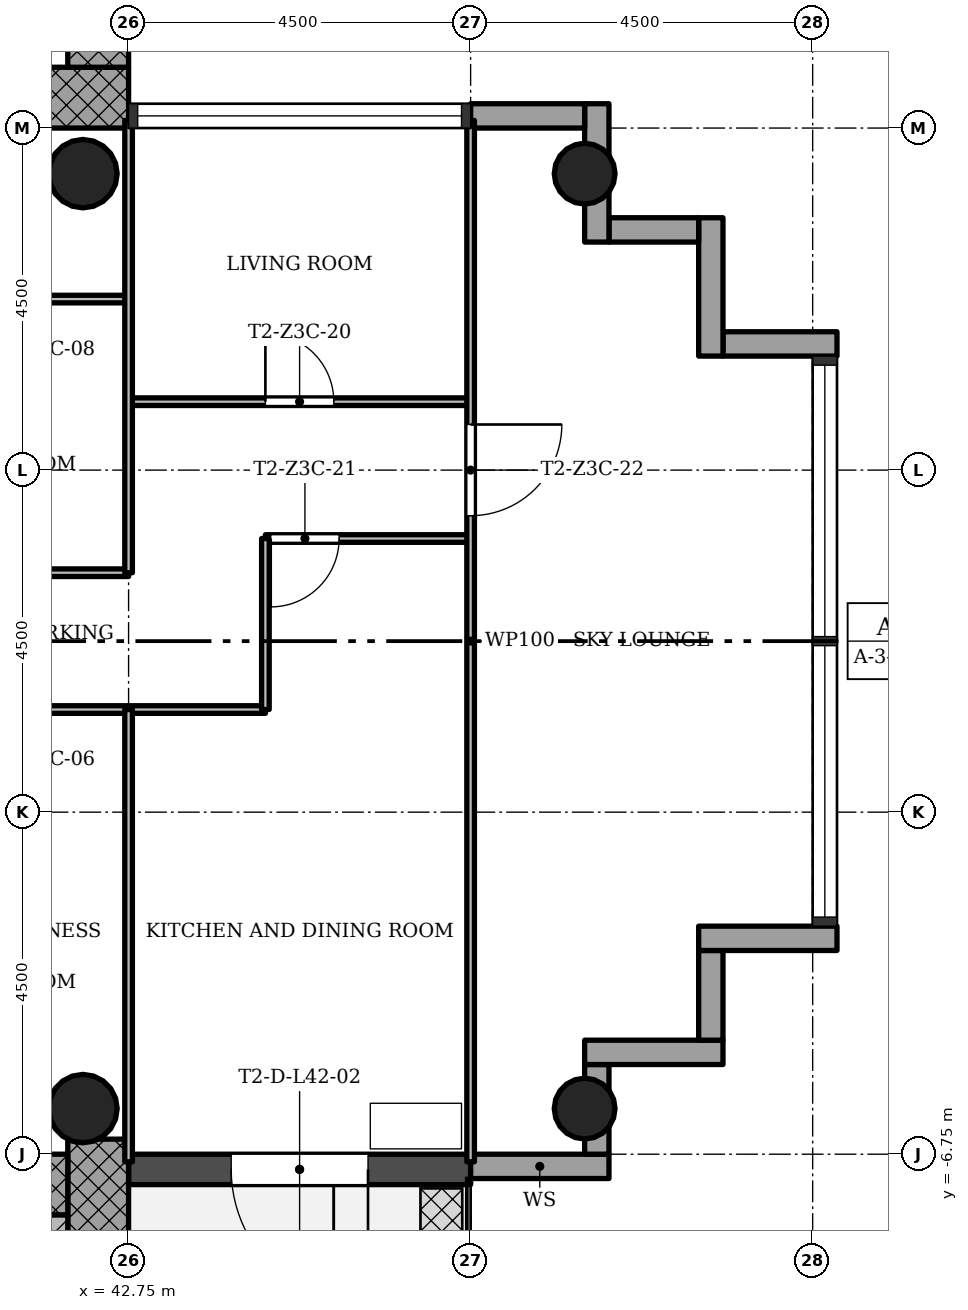
"""IFC4 building model, lengths in metres.
Left out: names, types, materials, properties, quantities, classifications, styles, units other than length and angle.
Written with IfcOpenShell. Run it as: python <this file> out.ifc"""

import sys

from ifc_helpers import new_model, si_unit, direction, frame, frame_2d, origin, origin_2d, place, context, subcontext, project, spatial, rectangle, hollow_circle, extrude, element, fill, save


model = new_model("IFC4")
c1 = context("Model", 3, precision=1e-05, world=origin(), true_north=direction((0.0, 1.0)))
c2 = subcontext(c1, "Body", "Model", "MODEL_VIEW")
j1 = project(units=[si_unit("LENGTHUNIT", "METRE"), si_unit("PLANEANGLEUNIT", "RADIAN")], contexts=[c1])
p1 = place(None, origin())
s1 = spatial("IfcSite", under=j1, at=p1, CompositionType="ELEMENT")
p2 = place(p1, origin())
s2 = spatial("IfcBuilding", under=s1, at=p2, CompositionType="ELEMENT")
p3 = place(p2, frame((0.0, 0.0, 154.1)))
s3 = spatial("IfcBuildingStorey", under=s2, at=p3, CompositionType="ELEMENT", Elevation=154.1)
p4 = place(p3, frame((30.05, 7.15, 0.0), z_axis=(0.0, 0.0, 1.0), x_axis=(1.0, 0.0, 0.0)))
e1 = element("IfcWall", 1, at=p4, inside=s3, PredefinedType="SHEAR", context=c2, shape_type="SweptSolid", body=[
    extrude(rectangle(XDim=12.7, YDim=0.8, at=frame_2d((6.35, 0.0))), origin(), (0.0, 0.0, 1.0), 3.4),
])
p5 = place(p4, frame((5.05, 0.0, 0.0)))
e2 = element("IfcOpeningElement", 2, at=p5, cuts=e1, PredefinedType="OPENING", context=c2, shape_type="SweptSolid", body=[
    extrude(rectangle(XDim=1.8, YDim=2.1, at=frame_2d((0.9, 1.05))), frame((0.0, 0.41, 0.0), z_axis=(0.0, -1.0, 0.0), x_axis=(1.0, 0.0, 0.0)), (0.0, 0.0, 1.0), 0.82),
])
p6 = place(p3, frame((42.35, 7.55, 0.0), z_axis=(0.0, 0.0, 1.0), x_axis=(0.0, 1.0, 0.0)))
e3 = element("IfcWall", 3, at=p6, inside=s3, PredefinedType="SHEAR", context=c2, shape_type="SweptSolid", body=[
    extrude(rectangle(XDim=8.2, YDim=0.8, at=frame_2d((4.1, 0.0))), origin(), (0.0, 0.0, 1.0), 3.4),
])
p7 = place(p3, frame((42.35, -14.95, 0.0), z_axis=(0.0, 0.0, 1.0), x_axis=(0.0, 1.0, 0.0)))
e4 = element("IfcWall", 4, at=p7, inside=s3, PredefinedType="SHEAR", context=c2, shape_type="SweptSolid", body=[
    extrude(rectangle(XDim=8.398, YDim=0.8, at=frame_2d((4.199, 0.0))), origin(), (0.0, 0.0, 1.0), 3.4),
])
p8 = place(p3, frame((41.95, -7.15, 0.0), z_axis=(0.0, 0.0, 1.0), x_axis=(-1.0, 0.0, 0.0)))
e5 = element("IfcWall", 5, at=p8, inside=s3, PredefinedType="SHEAR", context=c2, shape_type="SweptSolid", body=[
    extrude(rectangle(XDim=12.7, YDim=0.8, at=frame_2d((6.35, 0.0))), origin(), (0.0, 0.0, 1.0), 3.4),
])
p9 = place(p8, frame((5.05, 0.0, 0.0)))
e6 = element("IfcOpeningElement", 6, at=p9, cuts=e5, PredefinedType="OPENING", context=c2, shape_type="SweptSolid", body=[
    extrude(rectangle(XDim=1.8, YDim=2.1, at=frame_2d((0.9, 1.05))), frame((0.0, 0.41, 0.0), z_axis=(0.0, -1.0, 0.0), x_axis=(1.0, 0.0, 0.0)), (0.0, 0.0, 1.0), 0.82),
])
for number, where, z_axis, x_axis in (
    (7, (48.75, -6.15, 0.0), (0.0, 0.0, 1.0), (1.0, 0.0, 0.0)),
    (8, (48.75, 6.15, 0.0), (0.0, 0.0, 1.0), (1.0, 0.0, 0.0)),
):
    element("IfcColumn", number, at=place(p3, frame(where, z_axis=z_axis, x_axis=x_axis)), inside=s3, PredefinedType="COLUMN", context=c2, shape_type="SweptSolid", body=[
        extrude(hollow_circle(Radius=0.4, WallThickness=0.028, at=origin_2d()), origin(), (0.0, 0.0, 1.0), 3.4),
    ])
for number, where, z_axis, x_axis in (
    (9, (42.15, -6.15, 0.0), (0.0, 0.0, 1.0), (1.0, 0.0, 0.0)),
    (10, (42.15, 6.15, 0.0), (0.0, 0.0, 1.0), (1.0, 0.0, 0.0)),
):
    element("IfcColumn", number, at=place(p3, frame(where, z_axis=z_axis, x_axis=x_axis)), inside=s3, PredefinedType="COLUMN", context=c2, shape_type="SweptSolid", body=[
        extrude(hollow_circle(Radius=0.45, WallThickness=0.032, at=origin_2d()), origin(), (0.0, 0.0, 1.0), 3.4),
    ])
p10 = place(p3, frame((42.75, -6.95, -0.02), z_axis=(0.0, 0.0, 1.0), x_axis=(1.0, 0.0, 0.0)))
e11 = element("IfcWall", 11, at=p10, inside=s3, PredefinedType="STANDARD", context=c2, shape_type="SweptSolid", body=[
    extrude(rectangle(XDim=4.5, YDim=0.4, at=frame_2d((2.25, 0.0))), origin(), (0.0, 0.0, 1.0), 3.12),
])
p11 = place(p10, frame((1.35, 0.0, 0.02)))
e12 = element("IfcOpeningElement", 12, at=p11, cuts=e11, PredefinedType="OPENING", context=c2, shape_type="SweptSolid", body=[
    extrude(rectangle(XDim=1.8, YDim=2.1, at=frame_2d((0.9, 1.05))), frame((0.0, 0.21, 0.0), z_axis=(0.0, -1.0, 0.0), x_axis=(1.0, 0.0, 0.0)), (0.0, 0.0, 1.0), 0.42),
])
p12 = place(p3, frame((47.25, -6.91, -0.3), z_axis=(0.0, 0.0, 1.0), x_axis=(1.0, 0.0, 0.0)))
e13 = element("IfcWall", 13, at=p12, inside=s3, PredefinedType="STANDARD", context=c2, shape_type="SweptSolid", body=[
    extrude(rectangle(XDim=1.82, YDim=0.32, at=frame_2d((0.91, 0.0))), origin(), (0.0, 0.0, 1.0), 3.4),
])
p13 = place(p3, frame((48.91, -6.75, -0.3), z_axis=(0.0, 0.0, 1.0), x_axis=(0.0, 1.0, 0.0)))
e14 = element("IfcWall", 14, at=p13, inside=s3, PredefinedType="STANDARD", context=c2, shape_type="SweptSolid", body=[
    extrude(rectangle(XDim=1.18, YDim=0.32, at=frame_2d((0.59, 0.0))), origin(), (0.0, 0.0, 1.0), 3.4),
])
p14 = place(p3, frame((48.75, -5.41, -0.3), z_axis=(0.0, 0.0, 1.0), x_axis=(1.0, 0.0, 0.0)))
e15 = element("IfcWall", 15, at=p14, inside=s3, PredefinedType="STANDARD", context=c2, shape_type="SweptSolid", body=[
    extrude(rectangle(XDim=1.82, YDim=0.32, at=frame_2d((0.91, 0.0))), origin(), (0.0, 0.0, 1.0), 3.4),
])
p15 = place(p3, frame((50.41, -5.25, -0.3), z_axis=(0.0, 0.0, 1.0), x_axis=(0.0, 1.0, 0.0)))
e16 = element("IfcWall", 16, at=p15, inside=s3, PredefinedType="STANDARD", context=c2, shape_type="SweptSolid", body=[
    extrude(rectangle(XDim=1.18, YDim=0.32, at=frame_2d((0.59, 0.0))), origin(), (0.0, 0.0, 1.0), 3.4),
])
p16 = place(p3, frame((50.25, -3.91, -0.3), z_axis=(0.0, 0.0, 1.0), x_axis=(1.0, 0.0, 0.0)))
e17 = element("IfcWall", 17, at=p16, inside=s3, PredefinedType="STANDARD", context=c2, shape_type="SweptSolid", body=[
    extrude(rectangle(XDim=1.82, YDim=0.32, at=frame_2d((0.91, 0.0))), origin(), (0.0, 0.0, 1.0), 3.4),
])
p17 = place(p3, frame((52.07, 3.91, -0.3), z_axis=(0.0, 0.0, 1.0), x_axis=(-1.0, 0.0, 0.0)))
e18 = element("IfcWall", 18, at=p17, inside=s3, PredefinedType="STANDARD", context=c2, shape_type="SweptSolid", body=[
    extrude(rectangle(XDim=1.5, YDim=0.32, at=frame_2d((0.75, 0.0))), origin(), (0.0, 0.0, 1.0), 3.4),
])
p18 = place(p3, frame((50.41, 3.75, -0.3), z_axis=(0.0, 0.0, 1.0), x_axis=(0.0, 1.0, 0.0)))
e19 = element("IfcWall", 19, at=p18, inside=s3, PredefinedType="STANDARD", context=c2, shape_type="SweptSolid", body=[
    extrude(rectangle(XDim=1.82, YDim=0.32, at=frame_2d((0.91, 0.0))), origin(), (0.0, 0.0, 1.0), 3.4),
])
p19 = place(p3, frame((50.25, 5.41, -0.3), z_axis=(0.0, 0.0, 1.0), x_axis=(-1.0, 0.0, 0.0)))
e20 = element("IfcWall", 20, at=p19, inside=s3, PredefinedType="STANDARD", context=c2, shape_type="SweptSolid", body=[
    extrude(rectangle(XDim=1.18, YDim=0.32, at=frame_2d((0.59, 0.0))), origin(), (0.0, 0.0, 1.0), 3.4),
])
p20 = place(p3, frame((48.91, 5.25, -0.3), z_axis=(0.0, 0.0, 1.0), x_axis=(0.0, 1.0, 0.0)))
e21 = element("IfcWall", 21, at=p20, inside=s3, PredefinedType="STANDARD", context=c2, shape_type="SweptSolid", body=[
    extrude(rectangle(XDim=1.82, YDim=0.32, at=frame_2d((0.91, 0.0))), origin(), (0.0, 0.0, 1.0), 3.4),
])
p21 = place(p3, frame((48.75, 6.91, -0.3), z_axis=(0.0, 0.0, 1.0), x_axis=(-1.0, 0.0, 0.0)))
e22 = element("IfcWall", 22, at=p21, inside=s3, PredefinedType="STANDARD", context=c2, shape_type="SweptSolid", body=[
    extrude(rectangle(XDim=1.5, YDim=0.32, at=frame_2d((0.75, 0.0))), origin(), (0.0, 0.0, 1.0), 3.4),
])
p22 = place(p3, frame((44.55, -0.9, 0.0), z_axis=(0.0, 0.0, 1.0), x_axis=(-1.0, 0.0, 0.0)))
e23 = element("IfcWall", 23, at=p22, inside=s3, PredefinedType="PARTITIONING", context=c2, shape_type="SweptSolid", body=[
    extrude(rectangle(XDim=4.05, YDim=0.1, at=frame_2d((2.025, 0.0))), origin(), (0.0, 0.0, 1.0), 3.0),
])
p23 = place(p3, frame((42.75, 0.9, 0.0), z_axis=(0.0, 0.0, 1.0), x_axis=(-1.0, 0.0, 0.0)))
e24 = element("IfcWall", 24, at=p23, inside=s3, PredefinedType="PARTITIONING", context=c2, shape_type="SweptSolid", body=[
    extrude(rectangle(XDim=2.25, YDim=0.1, at=frame_2d((1.125, 0.0))), origin(), (0.0, 0.0, 1.0), 3.0),
])
p24 = place(p3, frame((47.25, 1.35, 0.0), z_axis=(0.0, 0.0, 1.0), x_axis=(-1.0, 0.0, 0.0)))
e25 = element("IfcWall", 25, at=p24, inside=s3, PredefinedType="PARTITIONING", context=c2, shape_type="SweptSolid", body=[
    extrude(rectangle(XDim=2.7, YDim=0.1, at=frame_2d((1.35, 0.0))), origin(), (0.0, 0.0, 1.0), 3.0),
])
p25 = place(p24, frame((1.73, 0.0, 0.0)))
e26 = element("IfcOpeningElement", 26, at=p25, cuts=e25, PredefinedType="OPENING", context=c2, shape_type="SweptSolid", body=[
    extrude(rectangle(XDim=0.9, YDim=2.1, at=frame_2d((0.45, 1.05))), frame((0.0, 0.06, 0.0), z_axis=(0.0, -1.0, 0.0), x_axis=(1.0, 0.0, 0.0)), (0.0, 0.0, 1.0), 0.12),
])
p26 = place(p3, frame((47.25, 3.15, 0.0), z_axis=(0.0, 0.0, 1.0), x_axis=(-1.0, 0.0, 0.0)))
e27 = element("IfcWall", 27, at=p26, inside=s3, PredefinedType="PARTITIONING", context=c2, shape_type="SweptSolid", body=[
    extrude(rectangle(XDim=4.5, YDim=0.1, at=frame_2d((2.25, 0.0))), origin(), (0.0, 0.0, 1.0), 3.0),
])
p27 = place(p26, frame((1.8, 0.0, 0.0)))
e28 = element("IfcOpeningElement", 28, at=p27, cuts=e27, PredefinedType="OPENING", context=c2, shape_type="SweptSolid", body=[
    extrude(rectangle(XDim=0.9, YDim=2.1, at=frame_2d((0.45, 1.05))), frame((0.0, 0.06, 0.0), z_axis=(0.0, -1.0, 0.0), x_axis=(1.0, 0.0, 0.0)), (0.0, 0.0, 1.0), 0.12),
])
p28 = place(p3, frame((42.75, 4.5, 0.0), z_axis=(0.0, 0.0, 1.0), x_axis=(-1.0, 0.0, 0.0)))
e29 = element("IfcWall", 29, at=p28, inside=s3, PredefinedType="PARTITIONING", context=c2, shape_type="SweptSolid", body=[
    extrude(rectangle(XDim=5.25, YDim=0.1, at=frame_2d((2.625, 0.0))), origin(), (0.0, 0.0, 1.0), 3.0),
])
p29 = place(p28, frame((3.3, 0.0, 0.0)))
e30 = element("IfcOpeningElement", 30, at=p29, cuts=e29, PredefinedType="OPENING", context=c2, shape_type="SweptSolid", body=[
    extrude(rectangle(XDim=0.9, YDim=2.1, at=frame_2d((0.45, 1.05))), frame((0.0, 0.06, 0.0), z_axis=(0.0, -1.0, 0.0), x_axis=(1.0, 0.0, 0.0)), (0.0, 0.0, 1.0), 0.12),
])
p30 = place(p3, frame((47.25, -6.85, 0.0), z_axis=(0.0, 0.0, 1.0), x_axis=(0.0, 1.0, 0.0)))
e31 = element("IfcWall", 31, at=p30, inside=s3, PredefinedType="PARTITIONING", context=c2, shape_type="SweptSolid", body=[
    extrude(rectangle(XDim=13.7, YDim=0.1, at=frame_2d((6.85, 0.0))), origin(), (0.0, 0.0, 1.0), 3.0),
])
p31 = place(p30, frame((8.5, 0.0, 0.0)))
e32 = element("IfcOpeningElement", 32, at=p31, cuts=e31, PredefinedType="OPENING", context=c2, shape_type="SweptSolid", body=[
    extrude(rectangle(XDim=1.2, YDim=2.1, at=frame_2d((0.6, 1.05))), frame((0.0, 0.06, 0.0), z_axis=(0.0, -1.0, 0.0), x_axis=(1.0, 0.0, 0.0)), (0.0, 0.0, 1.0), 0.12),
])
p32 = place(p3, frame((44.55, -0.9, 0.0), z_axis=(0.0, 0.0, 1.0), x_axis=(0.0, 1.0, 0.0)))
e33 = element("IfcWall", 33, at=p32, inside=s3, PredefinedType="PARTITIONING", context=c2, shape_type="SweptSolid", body=[
    extrude(rectangle(XDim=2.25, YDim=0.1, at=frame_2d((1.125, 0.0))), origin(), (0.0, 0.0, 1.0), 3.0),
])
for number, where, z_axis, x_axis in (
    (34, (42.75, -6.85, 0.0), (0.0, 0.0, 1.0), (0.0, 1.0, 0.0)),
    (35, (42.75, 0.9, 0.0), (0.0, 0.0, 1.0), (0.0, 1.0, 0.0)),
):
    element("IfcWall", number, at=place(p3, frame(where, z_axis=z_axis, x_axis=x_axis)), inside=s3, PredefinedType="PARTITIONING", context=c2, shape_type="SweptSolid", body=[
        extrude(rectangle(XDim=5.95, YDim=0.1, at=frame_2d((2.975, 0.0))), origin(), (0.0, 0.0, 1.0), 3.0),
    ])
p33 = place(p3, frame((37.85, -7.75, 0.0), z_axis=(0.0, 0.0, 1.0), x_axis=(1.0, 0.0, 0.0)))
e36 = element("IfcWall", 36, at=p33, inside=s3, PredefinedType="SHEAR", context=c2, shape_type="SweptSolid", body=[
    extrude(rectangle(XDim=4.1, YDim=0.4, at=frame_2d((2.05, 0.0))), origin(), (0.0, 0.0, 1.0), 3.4),
])
p34 = place(p11, origin())
e37 = element("IfcDoor", 37, at=p34, inside=s3, OperationType="SINGLE_SWING_RIGHT", PredefinedType="DOOR", context=c2, shape_type="SweptSolid", body=[
    extrude(rectangle(XDim=1.8, YDim=2.1, at=frame_2d((0.9, 1.05))), frame((0.0, 0.025, 0.0), z_axis=(0.0, -1.0, 0.0), x_axis=(1.0, 0.0, 0.0)), (0.0, 0.0, 1.0), 0.05),
])
fill(e12, e37)
p35 = place(p27, origin())
e38 = element("IfcDoor", 38, at=p35, inside=s3, OperationType="SINGLE_SWING_RIGHT", PredefinedType="DOOR", context=c2, shape_type="SweptSolid", body=[
    extrude(rectangle(XDim=0.9, YDim=2.1, at=frame_2d((0.45, 1.05))), frame((0.0, 0.025, 0.0), z_axis=(0.0, -1.0, 0.0), x_axis=(1.0, 0.0, 0.0)), (0.0, 0.0, 1.0), 0.05),
])
fill(e28, e38)
p36 = place(p25, origin())
e39 = element("IfcDoor", 39, at=p36, inside=s3, OperationType="SINGLE_SWING_LEFT", PredefinedType="DOOR", context=c2, shape_type="SweptSolid", body=[
    extrude(rectangle(XDim=0.9, YDim=2.1, at=frame_2d((0.45, 1.05))), frame((0.0, 0.025, 0.0), z_axis=(0.0, -1.0, 0.0), x_axis=(1.0, 0.0, 0.0)), (0.0, 0.0, 1.0), 0.05),
])
fill(e26, e39)
p37 = place(p31, origin())
e40 = element("IfcDoor", 40, at=p37, inside=s3, OperationType="SINGLE_SWING_RIGHT", PredefinedType="DOOR", context=c2, shape_type="SweptSolid", body=[
    extrude(rectangle(XDim=1.2, YDim=2.1, at=frame_2d((0.6, 1.05))), frame((0.0, 0.025, 0.0), z_axis=(0.0, -1.0, 0.0), x_axis=(1.0, 0.0, 0.0)), (0.0, 0.0, 1.0), 0.05),
])
fill(e32, e40)
save(model, sys.argv[1])
